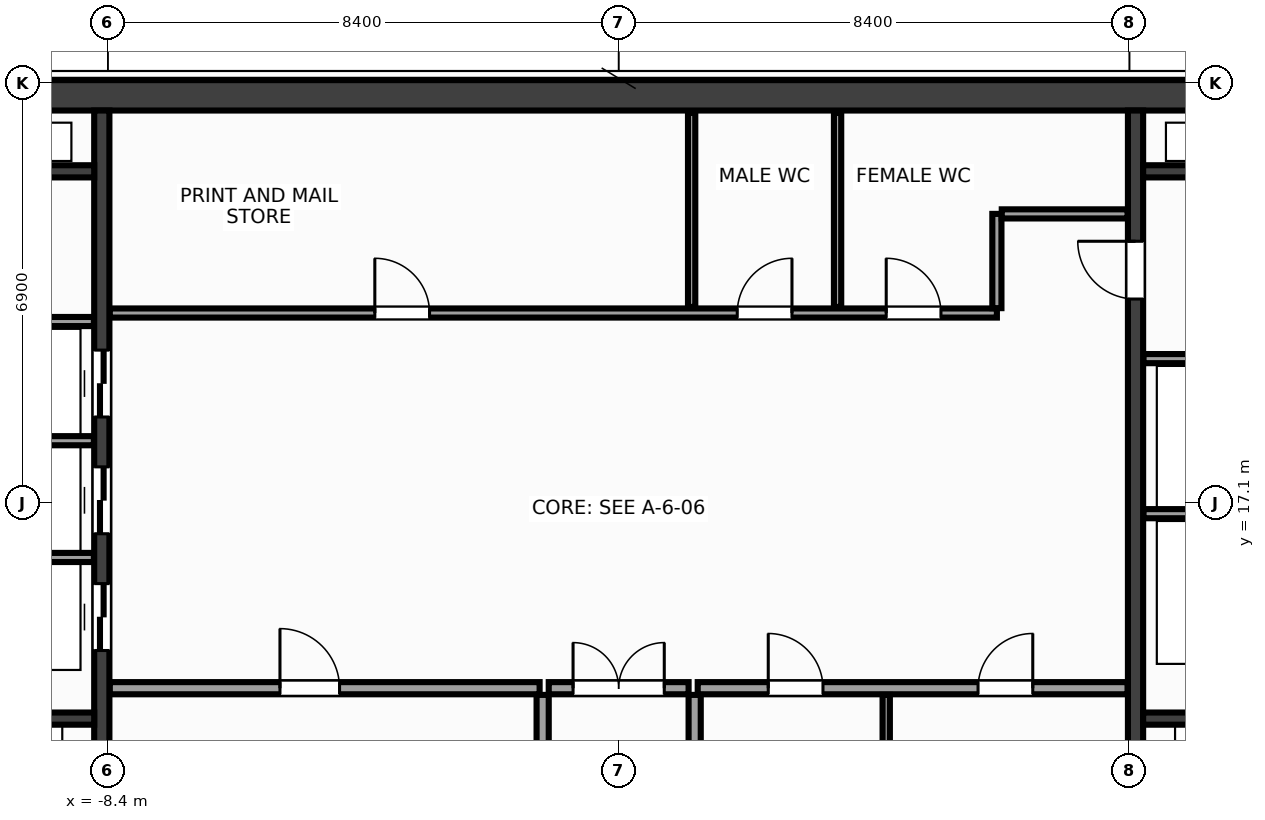
"""IFC4 building model, lengths in metres.
Left out: names, types, materials, properties, quantities, classifications, styles, units other than length and angle.
Written with IfcOpenShell. Run it as: python <this file> out.ifc"""

import sys

from ifc_helpers import new_model, si_unit, direction, frame, frame_2d, origin, place, context, subcontext, project, spatial, rectangle, extrude, source, transform, mapped, element, fill, save


model = new_model("IFC4")
c1 = context("Model", 3, precision=1e-05, world=origin(), true_north=direction((0.0, 1.0)))
c2 = subcontext(c1, "Body", "Model", "MODEL_VIEW")
j1 = project(units=[si_unit("LENGTHUNIT", "METRE"), si_unit("PLANEANGLEUNIT", "RADIAN")], contexts=[c1])
p1 = place(None, origin())
s1 = spatial("IfcSite", under=j1, at=p1, CompositionType="ELEMENT")
p2 = place(p1, origin())
s2 = spatial("IfcBuilding", under=s1, at=p2, CompositionType="ELEMENT")
p3 = place(p2, frame((0.0, 0.0, 282.8)))
s3 = spatial("IfcBuildingStorey", under=s2, at=p3, CompositionType="ELEMENT", Elevation=282.8)
m1 = source(origin(), c2, "Body", "SweptSolid", [
    extrude(rectangle(XDim=31.7, YDim=0.5, at=frame_2d((15.85, 0.0))), origin(), (0.0, 0.0, 1.0), 3.6),
])
p4 = place(p3, frame((-15.85, 23.8, 0.0), z_axis=(0.0, 0.0, 1.0), x_axis=(1.0, 0.0, 0.0)))
e1 = element("IfcWall", 1, at=p4, inside=s3, PredefinedType="SHEAR", context=c2, shape_type="MappedRepresentation", body=[
    mapped(m1, transform((0.0, 0.0, 0.0), x_axis=(1.0, 0.0, 0.0), y_axis=(0.0, 1.0, 0.0), z_axis=(0.0, 0.0, 1.0), scale=1.0)),
])
m2 = source(origin(), c2, "Body", "SweptSolid", [
    extrude(rectangle(XDim=13.1, YDim=0.25, at=frame_2d((6.55, 0.0))), origin(), (0.0, 0.0, 1.0), 3.6),
])
p5 = place(p3, frame((-8.5, 10.45, 0.0), z_axis=(0.0, 0.0, 1.0), x_axis=(0.0, 1.0, 0.0)))
e2 = element("IfcWall", 2, at=p5, inside=s3, PredefinedType="SHEAR", context=c2, shape_type="MappedRepresentation", body=[
    mapped(m2, transform((0.0, 0.0, 0.0), x_axis=(1.0, 0.0, 0.0), y_axis=(0.0, 1.0, 0.0), z_axis=(0.0, 0.0, 1.0), scale=1.0)),
])
p6 = place(p5, frame((4.22, 0.0, 0.0)))
e3 = element("IfcOpeningElement", 3, at=p6, cuts=e2, PredefinedType="OPENING", context=c2, shape_type="SweptSolid", body=[
    extrude(rectangle(XDim=1.1, YDim=2.15, at=frame_2d((0.55, 1.075))), frame((0.0, 0.137, 0.0), z_axis=(0.0, -1.0, 0.0), x_axis=(1.0, 0.0, 0.0)), (0.0, 0.0, 1.0), 0.274),
])
p7 = place(p5, frame((6.14, 0.0, 0.0)))
e4 = element("IfcOpeningElement", 4, at=p7, cuts=e2, PredefinedType="OPENING", context=c2, shape_type="SweptSolid", body=[
    extrude(rectangle(XDim=1.1, YDim=2.15, at=frame_2d((0.55, 1.075))), frame((0.0, 0.137, 0.0), z_axis=(0.0, -1.0, 0.0), x_axis=(1.0, 0.0, 0.0)), (0.0, 0.0, 1.0), 0.274),
])
p8 = place(p5, frame((8.06, 0.0, 0.0)))
e5 = element("IfcOpeningElement", 5, at=p8, cuts=e2, PredefinedType="OPENING", context=c2, shape_type="SweptSolid", body=[
    extrude(rectangle(XDim=1.1, YDim=2.15, at=frame_2d((0.55, 1.075))), frame((0.0, 0.137, 0.0), z_axis=(0.0, -1.0, 0.0), x_axis=(1.0, 0.0, 0.0)), (0.0, 0.0, 1.0), 0.274),
])
p9 = place(p3, frame((8.5, 10.45, 0.0), z_axis=(0.0, 0.0, 1.0), x_axis=(0.0, 1.0, 0.0)))
e6 = element("IfcWall", 6, at=p9, inside=s3, PredefinedType="SHEAR", context=c2, shape_type="MappedRepresentation", body=[
    mapped(m2, transform((0.0, 0.0, 0.0), x_axis=(1.0, 0.0, 0.0), y_axis=(0.0, 1.0, 0.0), z_axis=(0.0, 0.0, 1.0), scale=1.0)),
])
p10 = place(p9, frame((10.0, 0.0, 0.0)))
e7 = element("IfcOpeningElement", 7, at=p10, cuts=e6, PredefinedType="OPENING", context=c2, shape_type="SweptSolid", body=[
    extrude(rectangle(XDim=0.95, YDim=2.15, at=frame_2d((0.475, 1.075))), frame((0.0, 0.137, 0.0), z_axis=(0.0, -1.0, 0.0), x_axis=(1.0, 0.0, 0.0)), (0.0, 0.0, 1.0), 0.274),
])
m3 = source(origin(), c2, "Body", "SweptSolid", [
    extrude(rectangle(XDim=2.825, YDim=0.2, at=frame_2d((1.413, 0.0))), origin(), (0.0, 0.0, 1.0), 3.6),
])
for number, where, z_axis, x_axis in (
    (8, (-11.45, 13.55, 0.0), (0.0, 0.0, 1.0), (1.0, 0.0, 0.0)),
    (9, (8.625, 13.55, 0.0), (0.0, 0.0, 1.0), (1.0, 0.0, 0.0)),
):
    element("IfcWall", number, at=place(p3, frame(where, z_axis=z_axis, x_axis=x_axis)), inside=s3, PredefinedType="SHEAR", context=c2, shape_type="MappedRepresentation", body=[
        mapped(m3, transform((0.0, 0.0, 0.0), x_axis=(1.0, 0.0, 0.0), y_axis=(0.0, 1.0, 0.0), z_axis=(0.0, 0.0, 1.0), scale=1.0)),
    ])
m4 = source(origin(), c2, "Body", "SweptSolid", [
    extrude(rectangle(XDim=3.02, YDim=0.2, at=frame_2d((1.51, 0.0))), origin(), (0.0, 0.0, 1.0), 3.6),
])
for number, where, z_axis, x_axis in (
    (10, (-11.645, 22.55, 0.0), (0.0, 0.0, 1.0), (1.0, 0.0, 0.0)),
    (11, (8.625, 22.55, 0.0), (0.0, 0.0, 1.0), (1.0, 0.0, 0.0)),
):
    element("IfcWall", number, at=place(p3, frame(where, z_axis=z_axis, x_axis=x_axis)), inside=s3, PredefinedType="SHEAR", context=c2, shape_type="MappedRepresentation", body=[
        mapped(m4, transform((0.0, 0.0, 0.0), x_axis=(1.0, 0.0, 0.0), y_axis=(0.0, 1.0, 0.0), z_axis=(0.0, 0.0, 1.0), scale=1.0)),
    ])
m5 = source(origin(), c2, "Body", "SweptSolid", [
    extrude(rectangle(XDim=3.01, YDim=0.15, at=frame_2d((1.505, 0.0))), origin(), (0.0, 0.0, 1.0), 3.37),
])
for number, where, z_axis, x_axis in (
    (12, (-11.64, 16.2, 0.0), (0.0, 0.0, 1.0), (1.0, 0.0, 0.0)),
    (13, (-11.64, 18.12, 0.0), (0.0, 0.0, 1.0), (1.0, 0.0, 0.0)),
    (14, (-11.64, 20.08, 0.0), (0.0, 0.0, 1.0), (1.0, 0.0, 0.0)),
    (15, (8.63, 16.92, 0.0), (0.0, 0.0, 1.0), (1.0, 0.0, 0.0)),
    (16, (8.63, 19.47, 0.0), (0.0, 0.0, 1.0), (1.0, 0.0, 0.0)),
):
    element("IfcWall", number, at=place(p3, frame(where, z_axis=z_axis, x_axis=x_axis)), inside=s3, PredefinedType="PARTITIONING", context=c2, shape_type="MappedRepresentation", body=[
        mapped(m5, transform((0.0, 0.0, 0.0), x_axis=(1.0, 0.0, 0.0), y_axis=(0.0, 1.0, 0.0), z_axis=(0.0, 0.0, 1.0), scale=1.0)),
    ])
m6 = source(origin(), c2, "Body", "SweptSolid", [
    extrude(rectangle(XDim=7.07, YDim=0.2, at=frame_2d((3.535, 0.0))), origin(), (0.0, 0.0, 1.0), 3.37),
])
p11 = place(p3, frame((-8.37, 14.05, 0.0), z_axis=(0.0, 0.0, 1.0), x_axis=(1.0, 0.0, 0.0)))
e17 = element("IfcWall", 17, at=p11, inside=s3, PredefinedType="PARTITIONING", context=c2, shape_type="MappedRepresentation", body=[
    mapped(m6, transform((0.0, 0.0, 0.0), x_axis=(1.0, 0.0, 0.0), y_axis=(0.0, 1.0, 0.0), z_axis=(0.0, 0.0, 1.0), scale=1.0)),
])
p12 = place(p11, frame((2.8, 0.0, 0.0)))
e18 = element("IfcOpeningElement", 18, at=p12, cuts=e17, PredefinedType="OPENING", context=c2, shape_type="SweptSolid", body=[
    extrude(rectangle(XDim=0.98, YDim=2.15, at=frame_2d((0.49, 1.075))), frame((0.0, 0.112, 0.0), z_axis=(0.0, -1.0, 0.0), x_axis=(1.0, 0.0, 0.0)), (0.0, 0.0, 1.0), 0.224),
])
p13 = place(p3, frame((1.3, 14.05, 0.0), z_axis=(0.0, 0.0, 1.0), x_axis=(1.0, 0.0, 0.0)))
e19 = element("IfcWall", 19, at=p13, inside=s3, PredefinedType="PARTITIONING", context=c2, shape_type="MappedRepresentation", body=[
    mapped(m6, transform((0.0, 0.0, 0.0), x_axis=(1.0, 0.0, 0.0), y_axis=(0.0, 1.0, 0.0), z_axis=(0.0, 0.0, 1.0), scale=1.0)),
])
p14 = place(p13, frame((1.16, 0.0, 0.0)))
e20 = element("IfcOpeningElement", 20, at=p14, cuts=e19, PredefinedType="OPENING", context=c2, shape_type="SweptSolid", body=[
    extrude(rectangle(XDim=0.9, YDim=2.15, at=frame_2d((0.45, 1.075))), frame((0.0, 0.112, 0.0), z_axis=(0.0, -1.0, 0.0), x_axis=(1.0, 0.0, 0.0)), (0.0, 0.0, 1.0), 0.224),
])
p15 = place(p13, frame((4.61, 0.0, 0.0)))
e21 = element("IfcOpeningElement", 21, at=p15, cuts=e19, PredefinedType="OPENING", context=c2, shape_type="SweptSolid", body=[
    extrude(rectangle(XDim=0.9, YDim=2.15, at=frame_2d((0.45, 1.075))), frame((0.0, 0.112, 0.0), z_axis=(0.0, -1.0, 0.0), x_axis=(1.0, 0.0, 0.0)), (0.0, 0.0, 1.0), 0.224),
])
m7 = source(origin(), c2, "Body", "SweptSolid", [
    extrude(rectangle(XDim=3.49, YDim=0.2, at=frame_2d((1.745, 0.0))), origin(), (0.0, 0.0, 1.0), 3.37),
])
for number, where, z_axis, x_axis in (
    (22, (-1.25, 10.45, 0.0), (0.0, 0.0, 1.0), (0.0, 1.0, 0.0)),
    (23, (1.25, 10.45, 0.0), (0.0, 0.0, 1.0), (0.0, 1.0, 0.0)),
):
    element("IfcWall", number, at=place(p3, frame(where, z_axis=z_axis, x_axis=x_axis)), inside=s3, PredefinedType="PARTITIONING", context=c2, shape_type="MappedRepresentation", body=[
        mapped(m7, transform((0.0, 0.0, 0.0), x_axis=(1.0, 0.0, 0.0), y_axis=(0.0, 1.0, 0.0), z_axis=(0.0, 0.0, 1.0), scale=1.0)),
    ])
m8 = source(origin(), c2, "Body", "SweptSolid", [
    extrude(rectangle(XDim=2.3, YDim=0.2, at=frame_2d((1.15, 0.0))), origin(), (0.0, 0.0, 1.0), 3.37),
])
p16 = place(p3, frame((-1.15, 14.05, 0.0), z_axis=(0.0, 0.0, 1.0), x_axis=(1.0, 0.0, 0.0)))
e24 = element("IfcWall", 24, at=p16, inside=s3, PredefinedType="PARTITIONING", context=c2, shape_type="MappedRepresentation", body=[
    mapped(m8, transform((0.0, 0.0, 0.0), x_axis=(1.0, 0.0, 0.0), y_axis=(0.0, 1.0, 0.0), z_axis=(0.0, 0.0, 1.0), scale=1.0)),
])
p17 = place(p16, frame((0.4, 0.0, 0.0)))
e25 = element("IfcOpeningElement", 25, at=p17, cuts=e24, PredefinedType="OPENING", context=c2, shape_type="SweptSolid", body=[
    extrude(rectangle(XDim=1.5, YDim=2.2, at=frame_2d((0.75, 1.1))), frame((0.0, 0.112, 0.0), z_axis=(0.0, -1.0, 0.0), x_axis=(1.0, 0.0, 0.0)), (0.0, 0.0, 1.0), 0.224),
])
m9 = source(origin(), c2, "Body", "SweptSolid", [
    extrude(rectangle(XDim=14.59, YDim=0.15, at=frame_2d((7.295, 0.0))), origin(), (0.0, 0.0, 1.0), 3.37),
])
p18 = place(p3, frame((-8.37, 20.22, 0.0), z_axis=(0.0, 0.0, 1.0), x_axis=(1.0, 0.0, 0.0)))
e26 = element("IfcWall", 26, at=p18, inside=s3, PredefinedType="PARTITIONING", context=c2, shape_type="MappedRepresentation", body=[
    mapped(m9, transform((0.0, 0.0, 0.0), x_axis=(1.0, 0.0, 0.0), y_axis=(0.0, 1.0, 0.0), z_axis=(0.0, 0.0, 1.0), scale=1.0)),
])
p19 = place(p18, frame((4.36, 0.0, 0.0)))
e27 = element("IfcOpeningElement", 27, at=p19, cuts=e26, PredefinedType="OPENING", context=c2, shape_type="SweptSolid", body=[
    extrude(rectangle(XDim=0.9, YDim=2.15, at=frame_2d((0.45, 1.075))), frame((0.0, 0.087, 0.0), z_axis=(0.0, -1.0, 0.0), x_axis=(1.0, 0.0, 0.0)), (0.0, 0.0, 1.0), 0.174),
])
p20 = place(p18, frame((10.32, 0.0, 0.0)))
e28 = element("IfcOpeningElement", 28, at=p20, cuts=e26, PredefinedType="OPENING", context=c2, shape_type="SweptSolid", body=[
    extrude(rectangle(XDim=0.9, YDim=2.15, at=frame_2d((0.45, 1.075))), frame((0.0, 0.087, 0.0), z_axis=(0.0, -1.0, 0.0), x_axis=(1.0, 0.0, 0.0)), (0.0, 0.0, 1.0), 0.174),
])
p21 = place(p18, frame((12.77, 0.0, 0.0)))
e29 = element("IfcOpeningElement", 29, at=p21, cuts=e26, PredefinedType="OPENING", context=c2, shape_type="SweptSolid", body=[
    extrude(rectangle(XDim=0.9, YDim=2.15, at=frame_2d((0.45, 1.075))), frame((0.0, 0.087, 0.0), z_axis=(0.0, -1.0, 0.0), x_axis=(1.0, 0.0, 0.0)), (0.0, 0.0, 1.0), 0.174),
])
m10 = source(origin(), c2, "Body", "SweptSolid", [
    extrude(rectangle(XDim=1.55, YDim=0.15, at=frame_2d((0.775, 0.0))), origin(), (0.0, 0.0, 1.0), 3.37),
])
p22 = place(p3, frame((6.22, 20.3, 0.0), z_axis=(0.0, 0.0, 1.0), x_axis=(0.0, 1.0, 0.0)))
e30 = element("IfcWall", 30, at=p22, inside=s3, PredefinedType="PARTITIONING", context=c2, shape_type="MappedRepresentation", body=[
    mapped(m10, transform((0.0, 0.0, 0.0), x_axis=(1.0, 0.0, 0.0), y_axis=(0.0, 1.0, 0.0), z_axis=(0.0, 0.0, 1.0), scale=1.0)),
])
m11 = source(origin(), c2, "Body", "SweptSolid", [
    extrude(rectangle(XDim=2.07, YDim=0.15, at=frame_2d((1.035, 0.0))), origin(), (0.0, 0.0, 1.0), 3.37),
])
p23 = place(p3, frame((6.3, 21.85, 0.0), z_axis=(0.0, 0.0, 1.0), x_axis=(1.0, 0.0, 0.0)))
e31 = element("IfcWall", 31, at=p23, inside=s3, PredefinedType="PARTITIONING", context=c2, shape_type="MappedRepresentation", body=[
    mapped(m11, transform((0.0, 0.0, 0.0), x_axis=(1.0, 0.0, 0.0), y_axis=(0.0, 1.0, 0.0), z_axis=(0.0, 0.0, 1.0), scale=1.0)),
])
m12 = source(origin(), c2, "Body", "SweptSolid", [
    extrude(rectangle(XDim=3.49, YDim=0.12, at=frame_2d((1.745, 0.0))), origin(), (0.0, 0.0, 1.0), 3.37),
])
p24 = place(p3, frame((4.4, 10.45, 0.0), z_axis=(0.0, 0.0, 1.0), x_axis=(0.0, 1.0, 0.0)))
e32 = element("IfcWall", 32, at=p24, inside=s3, PredefinedType="PARTITIONING", context=c2, shape_type="MappedRepresentation", body=[
    mapped(m12, transform((0.0, 0.0, 0.0), x_axis=(1.0, 0.0, 0.0), y_axis=(0.0, 1.0, 0.0), z_axis=(0.0, 0.0, 1.0), scale=1.0)),
])
m13 = source(origin(), c2, "Body", "SweptSolid", [
    extrude(rectangle(XDim=3.19, YDim=0.12, at=frame_2d((1.595, 0.0))), origin(), (0.0, 0.0, 1.0), 3.37),
])
for number, where, z_axis, x_axis in (
    (33, (1.2, 20.32, 0.0), (0.0, 0.0, 1.0), (0.0, 1.0, 0.0)),
    (34, (3.6, 20.32, 0.0), (0.0, 0.0, 1.0), (0.0, 1.0, 0.0)),
):
    element("IfcWall", number, at=place(p3, frame(where, z_axis=z_axis, x_axis=x_axis)), inside=s3, PredefinedType="PARTITIONING", context=c2, shape_type="MappedRepresentation", body=[
        mapped(m13, transform((0.0, 0.0, 0.0), x_axis=(1.0, 0.0, 0.0), y_axis=(0.0, 1.0, 0.0), z_axis=(0.0, 0.0, 1.0), scale=1.0)),
    ])
m14 = source(origin(), c2, "Body", "SweptSolid", [
    extrude(rectangle(XDim=1.1, YDim=2.15, at=frame_2d((0.55, 1.075))), frame((0.0, 0.025, 0.0), z_axis=(0.0, -1.0, 0.0), x_axis=(1.0, 0.0, 0.0)), (0.0, 0.0, 1.0), 0.05),
])
p25 = place(p6, origin())
e35 = element("IfcDoor", 35, at=p25, inside=s3, OperationType="DOUBLE_DOOR_SLIDING", PredefinedType="DOOR", context=c2, shape_type="MappedRepresentation", body=[
    mapped(m14, transform((0.0, 0.0, 0.0), x_axis=(1.0, 0.0, 0.0), y_axis=(0.0, 1.0, 0.0), z_axis=(0.0, 0.0, 1.0), scale=1.0)),
])
fill(e3, e35)
p26 = place(p7, origin())
e36 = element("IfcDoor", 36, at=p26, inside=s3, OperationType="DOUBLE_DOOR_SLIDING", PredefinedType="DOOR", context=c2, shape_type="MappedRepresentation", body=[
    mapped(m14, transform((0.0, 0.0, 0.0), x_axis=(1.0, 0.0, 0.0), y_axis=(0.0, 1.0, 0.0), z_axis=(0.0, 0.0, 1.0), scale=1.0)),
])
fill(e4, e36)
p27 = place(p8, origin())
e37 = element("IfcDoor", 37, at=p27, inside=s3, OperationType="DOUBLE_DOOR_SLIDING", PredefinedType="DOOR", context=c2, shape_type="MappedRepresentation", body=[
    mapped(m14, transform((0.0, 0.0, 0.0), x_axis=(1.0, 0.0, 0.0), y_axis=(0.0, 1.0, 0.0), z_axis=(0.0, 0.0, 1.0), scale=1.0)),
])
fill(e5, e37)
m15 = source(origin(), c2, "Body", "SweptSolid", [
    extrude(rectangle(XDim=0.95, YDim=2.15, at=frame_2d((0.475, 1.075))), frame((0.0, 0.025, 0.0), z_axis=(0.0, -1.0, 0.0), x_axis=(1.0, 0.0, 0.0)), (0.0, 0.0, 1.0), 0.05),
])
p28 = place(p10, origin())
e38 = element("IfcDoor", 38, at=p28, inside=s3, OperationType="SINGLE_SWING_RIGHT", PredefinedType="DOOR", context=c2, shape_type="MappedRepresentation", body=[
    mapped(m15, transform((0.0, 0.0, 0.0), x_axis=(1.0, 0.0, 0.0), y_axis=(0.0, 1.0, 0.0), z_axis=(0.0, 0.0, 1.0), scale=1.0)),
])
fill(e7, e38)
m16 = source(origin(), c2, "Body", "SweptSolid", [
    extrude(rectangle(XDim=0.98, YDim=2.15, at=frame_2d((0.49, 1.075))), frame((0.0, 0.025, 0.0), z_axis=(0.0, -1.0, 0.0), x_axis=(1.0, 0.0, 0.0)), (0.0, 0.0, 1.0), 0.05),
])
p29 = place(p12, origin())
e39 = element("IfcDoor", 39, at=p29, inside=s3, OperationType="SINGLE_SWING_LEFT", PredefinedType="DOOR", context=c2, shape_type="MappedRepresentation", body=[
    mapped(m16, transform((0.0, 0.0, 0.0), x_axis=(1.0, 0.0, 0.0), y_axis=(0.0, 1.0, 0.0), z_axis=(0.0, 0.0, 1.0), scale=1.0)),
])
fill(e18, e39)
m17 = source(origin(), c2, "Body", "SweptSolid", [
    extrude(rectangle(XDim=0.9, YDim=2.15, at=frame_2d((0.45, 1.075))), frame((0.0, 0.025, 0.0), z_axis=(0.0, -1.0, 0.0), x_axis=(1.0, 0.0, 0.0)), (0.0, 0.0, 1.0), 0.05),
])
p30 = place(p14, origin())
e40 = element("IfcDoor", 40, at=p30, inside=s3, OperationType="SINGLE_SWING_LEFT", PredefinedType="DOOR", context=c2, shape_type="MappedRepresentation", body=[
    mapped(m17, transform((0.0, 0.0, 0.0), x_axis=(1.0, 0.0, 0.0), y_axis=(0.0, 1.0, 0.0), z_axis=(0.0, 0.0, 1.0), scale=1.0)),
])
fill(e20, e40)
p31 = place(p15, origin())
e41 = element("IfcDoor", 41, at=p31, inside=s3, OperationType="SINGLE_SWING_RIGHT", PredefinedType="DOOR", context=c2, shape_type="MappedRepresentation", body=[
    mapped(m17, transform((0.0, 0.0, 0.0), x_axis=(1.0, 0.0, 0.0), y_axis=(0.0, 1.0, 0.0), z_axis=(0.0, 0.0, 1.0), scale=1.0)),
])
fill(e21, e41)
m18 = source(origin(), c2, "Body", "SweptSolid", [
    extrude(rectangle(XDim=1.5, YDim=2.2, at=frame_2d((0.75, 1.1))), frame((0.0, 0.025, 0.0), z_axis=(0.0, -1.0, 0.0), x_axis=(1.0, 0.0, 0.0)), (0.0, 0.0, 1.0), 0.05),
])
p32 = place(p17, origin())
e42 = element("IfcDoor", 42, at=p32, inside=s3, OperationType="DOUBLE_DOOR_SINGLE_SWING", PredefinedType="DOOR", context=c2, shape_type="MappedRepresentation", body=[
    mapped(m18, transform((0.0, 0.0, 0.0), x_axis=(1.0, 0.0, 0.0), y_axis=(0.0, 1.0, 0.0), z_axis=(0.0, 0.0, 1.0), scale=1.0)),
])
fill(e25, e42)
p33 = place(p19, origin())
e43 = element("IfcDoor", 43, at=p33, inside=s3, OperationType="SINGLE_SWING_LEFT", PredefinedType="DOOR", context=c2, shape_type="MappedRepresentation", body=[
    mapped(m17, transform((0.0, 0.0, 0.0), x_axis=(1.0, 0.0, 0.0), y_axis=(0.0, 1.0, 0.0), z_axis=(0.0, 0.0, 1.0), scale=1.0)),
])
fill(e27, e43)
p34 = place(p20, origin())
e44 = element("IfcDoor", 44, at=p34, inside=s3, OperationType="SINGLE_SWING_RIGHT", PredefinedType="DOOR", context=c2, shape_type="MappedRepresentation", body=[
    mapped(m17, transform((0.0, 0.0, 0.0), x_axis=(1.0, 0.0, 0.0), y_axis=(0.0, 1.0, 0.0), z_axis=(0.0, 0.0, 1.0), scale=1.0)),
])
fill(e28, e44)
p35 = place(p21, origin())
e45 = element("IfcDoor", 45, at=p35, inside=s3, OperationType="SINGLE_SWING_LEFT", PredefinedType="DOOR", context=c2, shape_type="MappedRepresentation", body=[
    mapped(m17, transform((0.0, 0.0, 0.0), x_axis=(1.0, 0.0, 0.0), y_axis=(0.0, 1.0, 0.0), z_axis=(0.0, 0.0, 1.0), scale=1.0)),
])
fill(e29, e45)
save(model, sys.argv[1])
